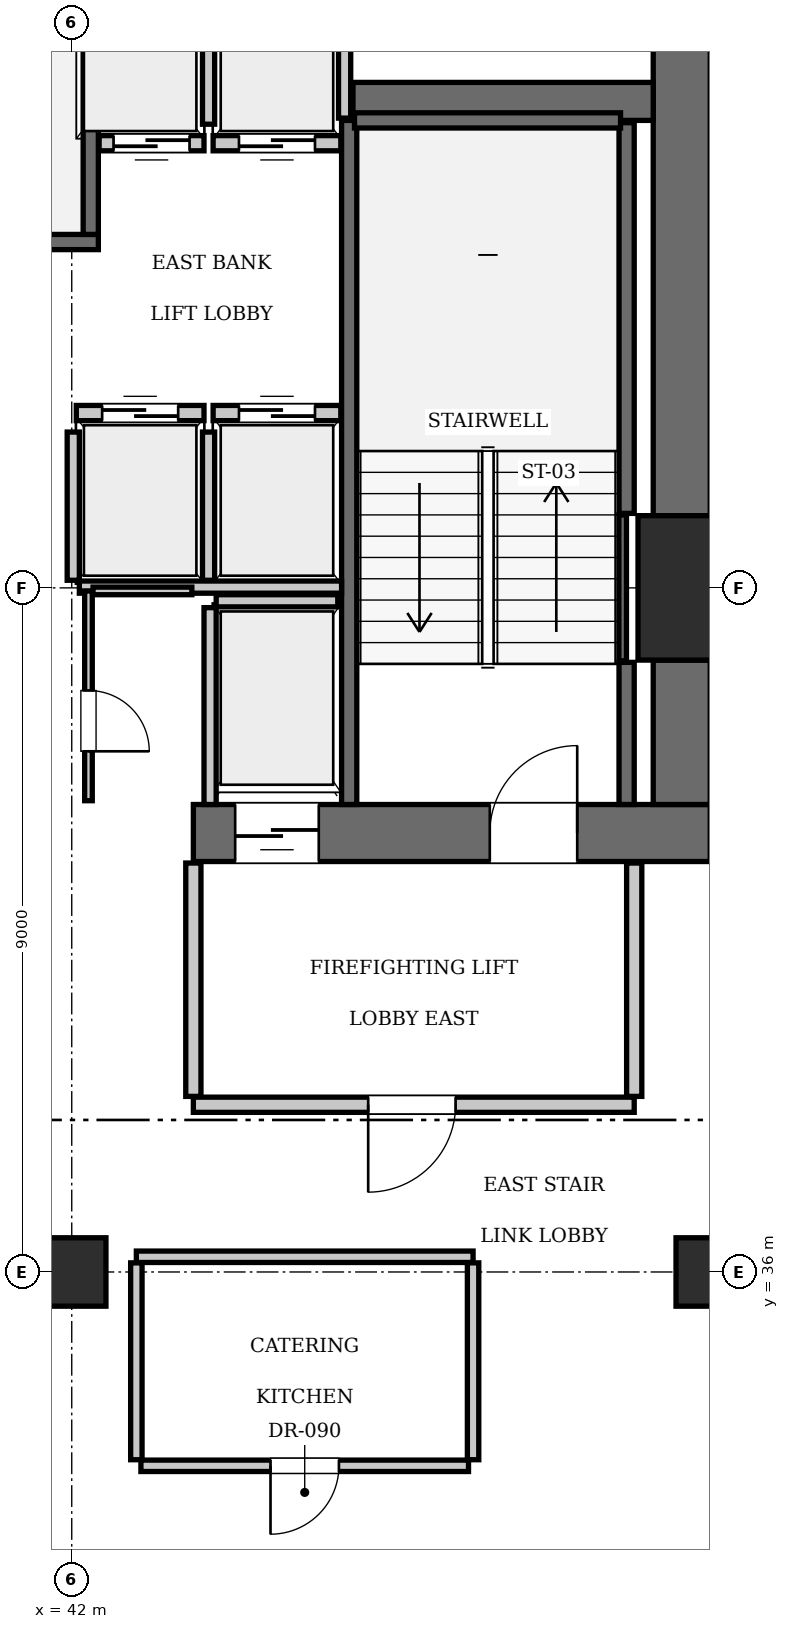
"""IFC4 building model, lengths in metres.
Left out: names, types, materials, properties, quantities, classifications, styles, units other than length and angle.
Written with IfcOpenShell. Run it as: python <this file> out.ifc"""

import sys

from ifc_helpers import new_model, si_unit, direction, frame, frame_2d, origin, origin_2d, place, context, subcontext, project, spatial, rectangle, extrude, element, fill, save


model = new_model("IFC4")
c1 = context("Model", 3, precision=1e-05, world=origin(), true_north=direction((0.0, 1.0)))
c2 = subcontext(c1, "Body", "Model", "MODEL_VIEW")
j1 = project(units=[si_unit("LENGTHUNIT", "METRE"), si_unit("PLANEANGLEUNIT", "RADIAN")], contexts=[c1])
p1 = place(None, origin())
s1 = spatial("IfcSite", under=j1, at=p1, CompositionType="ELEMENT")
p2 = place(p1, origin())
s2 = spatial("IfcBuilding", under=s1, at=p2, CompositionType="ELEMENT")
p3 = place(p2, frame((0.0, 0.0, 212.1)))
s3 = spatial("IfcBuildingStorey", under=s2, at=p3, CompositionType="ELEMENT", Elevation=212.1)
p4 = place(p3, frame((50.4, 45.0, 0.0), z_axis=(0.0, 0.0, 1.0), x_axis=(1.0, 0.0, 0.0)))
e1 = element("IfcColumn", 1, at=p4, inside=s3, PredefinedType="COLUMN", context=c2, shape_type="SweptSolid", body=[
    extrude(rectangle(XDim=1.9, YDim=1.9, at=origin_2d()), origin(), (0.0, 0.0, 1.0), 3.85),
])
p5 = place(p3, frame((43.6, 41.775, 0.0), z_axis=(0.0, 0.0, 1.0), x_axis=(1.0, 0.0, 0.0)))
e2 = element("IfcWall", 2, at=p5, inside=s3, PredefinedType="SHEAR", context=c2, shape_type="SweptSolid", body=[
    extrude(rectangle(XDim=6.8, YDim=0.75, at=frame_2d((3.4, 0.0))), origin(), (0.0, 0.0, 1.0), 3.85),
])
p6 = place(p5, frame((3.9, 0.0, 0.0)))
e3 = element("IfcOpeningElement", 3, at=p6, cuts=e2, PredefinedType="OPENING", context=c2, shape_type="SweptSolid", body=[
    extrude(rectangle(XDim=1.15, YDim=2.15, at=frame_2d((0.575, 1.075))), frame((0.0, 0.385, 0.0), z_axis=(0.0, -1.0, 0.0), x_axis=(1.0, 0.0, 0.0)), (0.0, 0.0, 1.0), 0.77),
])
p7 = place(p5, frame((0.55, 0.0, 0.0)))
e4 = element("IfcOpeningElement", 4, at=p7, cuts=e2, PredefinedType="OPENING", context=c2, shape_type="SweptSolid", body=[
    extrude(rectangle(XDim=1.1, YDim=2.2, at=frame_2d((0.55, 1.1))), frame((0.0, 0.385, 0.0), z_axis=(0.0, -1.0, 0.0), x_axis=(1.0, 0.0, 0.0)), (0.0, 0.0, 1.0), 0.77),
])
p8 = place(p3, frame((50.025, 42.15, 0.0), z_axis=(0.0, 0.0, 1.0), x_axis=(0.0, 1.0, 0.0)))
e5 = element("IfcWall", 5, at=p8, inside=s3, PredefinedType="SHEAR", context=c2, shape_type="SweptSolid", body=[
    extrude(rectangle(XDim=1.9, YDim=0.75, at=frame_2d((0.95, 0.0))), origin(), (0.0, 0.0, 1.0), 3.85),
])
p9 = place(p3, frame((50.025, 45.95, 0.0), z_axis=(0.0, 0.0, 1.0), x_axis=(0.0, 1.0, 0.0)))
e6 = element("IfcWall", 6, at=p9, inside=s3, PredefinedType="SHEAR", context=c2, shape_type="SweptSolid", body=[
    extrude(rectangle(XDim=7.3, YDim=0.75, at=frame_2d((3.65, 0.0))), origin(), (0.0, 0.0, 1.0), 3.85),
])
p10 = place(p3, frame((45.7, 51.4, 0.0), z_axis=(0.0, 0.0, 1.0), x_axis=(1.0, 0.0, 0.0)))
e7 = element("IfcWall", 7, at=p10, inside=s3, PredefinedType="SHEAR", context=c2, shape_type="SweptSolid", body=[
    extrude(rectangle(XDim=3.95, YDim=0.5, at=frame_2d((1.975, 0.0))), origin(), (0.0, 0.0, 1.0), 3.85),
])
for number, where, z_axis, x_axis in (
    (8, (42.0, 36.0, 0.0), (0.0, 0.0, 1.0), (1.0, 0.0, 0.0)),
    (9, (50.4, 36.0, 0.0), (0.0, 0.0, 1.0), (1.0, 0.0, 0.0)),
):
    element("IfcColumn", number, at=place(p3, frame(where, z_axis=z_axis, x_axis=x_axis)), inside=s3, PredefinedType="COLUMN", context=c2, shape_type="SweptSolid", body=[
        extrude(rectangle(XDim=0.9, YDim=0.9, at=origin_2d()), origin(), (0.0, 0.0, 1.0), 3.85),
    ])
p11 = place(p3, frame((33.25, 49.55, 0.0), z_axis=(0.0, 0.0, 1.0), x_axis=(1.0, 0.0, 0.0)))
e10 = element("IfcWall", 10, at=p11, inside=s3, PredefinedType="SOLIDWALL", context=c2, shape_type="SweptSolid", body=[
    extrude(rectangle(XDim=9.1, YDim=0.2, at=frame_2d((4.55, 0.0))), origin(), (0.0, 0.0, 1.0), 3.61),
])
p12 = place(p3, frame((42.25, 49.65, 0.0), z_axis=(0.0, 0.0, 1.0), x_axis=(0.0, 1.0, 0.0)))
e11 = element("IfcWall", 11, at=p12, inside=s3, PredefinedType="SOLIDWALL", context=c2, shape_type="SweptSolid", body=[
    extrude(rectangle(XDim=3.6, YDim=0.2, at=frame_2d((1.8, 0.0))), origin(), (0.0, 0.0, 1.0), 3.61),
])
p13 = place(p3, frame((45.65, 42.15, 0.0), z_axis=(0.0, 0.0, 1.0), x_axis=(0.0, 1.0, 0.0)))
e12 = element("IfcWall", 12, at=p13, inside=s3, PredefinedType="SOLIDWALL", context=c2, shape_type="SweptSolid", body=[
    extrude(rectangle(XDim=9.0, YDim=0.2, at=frame_2d((4.5, 0.0))), origin(), (0.0, 0.0, 1.0), 3.61),
])
p14 = place(p3, frame((49.3, 42.15, 0.0), z_axis=(0.0, 0.0, 1.0), x_axis=(0.0, 1.0, 0.0)))
e13 = element("IfcWall", 13, at=p14, inside=s3, PredefinedType="SOLIDWALL", context=c2, shape_type="SweptSolid", body=[
    extrude(rectangle(XDim=1.87, YDim=0.2, at=frame_2d((0.935, 0.0))), origin(), (0.0, 0.0, 1.0), 3.61),
])
p15 = place(p3, frame((49.3, 45.98, 0.0), z_axis=(0.0, 0.0, 1.0), x_axis=(0.0, 1.0, 0.0)))
e14 = element("IfcWall", 14, at=p15, inside=s3, PredefinedType="SOLIDWALL", context=c2, shape_type="SweptSolid", body=[
    extrude(rectangle(XDim=5.14, YDim=0.2, at=frame_2d((2.57, 0.0))), origin(), (0.0, 0.0, 1.0), 3.61),
])
p16 = place(p3, frame((45.72, 51.15, 0.0), z_axis=(0.0, 0.0, 1.0), x_axis=(1.0, 0.0, 0.0)))
e15 = element("IfcWall", 15, at=p16, inside=s3, PredefinedType="SOLIDWALL", context=c2, shape_type="SweptSolid", body=[
    extrude(rectangle(XDim=3.5, YDim=0.2, at=frame_2d((1.75, 0.0))), origin(), (0.0, 0.0, 1.0), 3.61),
])
p17 = place(p3, frame((49.248, 44.04, 0.0), z_axis=(0.0, 0.0, 1.0), x_axis=(0.0, 1.0, 0.0)))
e16 = element("IfcWall", 16, at=p17, inside=s3, PredefinedType="SOLIDWALL", context=c2, shape_type="SweptSolid", body=[
    extrude(rectangle(XDim=1.92, YDim=0.1, at=frame_2d((0.96, 0.0))), origin(), (0.0, 0.0, 1.0), 3.61),
])
p18 = place(p3, frame((42.06, 47.3, 0.0), z_axis=(0.0, 0.0, 1.0), x_axis=(1.0, 0.0, 0.0)))
e17 = element("IfcWall", 17, at=p18, inside=s3, PredefinedType="SOLIDWALL", context=c2, shape_type="SweptSolid", body=[
    extrude(rectangle(XDim=1.68, YDim=0.2, at=frame_2d((0.84, 0.0))), origin(), (0.0, 0.0, 1.0), 3.61),
])
p19 = place(p18, frame((0.34, 0.0, 0.0)))
e18 = element("IfcOpeningElement", 18, at=p19, cuts=e17, PredefinedType="OPENING", context=c2, shape_type="SweptSolid", body=[
    extrude(rectangle(XDim=1.0, YDim=2.15, at=frame_2d((0.5, 1.075))), frame((0.0, 0.11, 0.0), z_axis=(0.0, -1.0, 0.0), x_axis=(1.0, 0.0, 0.0)), (0.0, 0.0, 1.0), 0.22),
])
p20 = place(p3, frame((43.86, 47.3, 0.0), z_axis=(0.0, 0.0, 1.0), x_axis=(1.0, 0.0, 0.0)))
e19 = element("IfcWall", 19, at=p20, inside=s3, PredefinedType="SOLIDWALL", context=c2, shape_type="SweptSolid", body=[
    extrude(rectangle(XDim=1.68, YDim=0.2, at=frame_2d((0.84, 0.0))), origin(), (0.0, 0.0, 1.0), 3.61),
])
p21 = place(p20, frame((0.34, 0.0, 0.0)))
e20 = element("IfcOpeningElement", 20, at=p21, cuts=e19, PredefinedType="OPENING", context=c2, shape_type="SweptSolid", body=[
    extrude(rectangle(XDim=1.0, YDim=2.15, at=frame_2d((0.5, 1.075))), frame((0.0, 0.11, 0.0), z_axis=(0.0, -1.0, 0.0), x_axis=(1.0, 0.0, 0.0)), (0.0, 0.0, 1.0), 0.22),
])
p22 = place(p3, frame((42.36, 50.85, 0.0), z_axis=(0.0, 0.0, 1.0), x_axis=(1.0, 0.0, 0.0)))
e21 = element("IfcWall", 21, at=p22, inside=s3, PredefinedType="SOLIDWALL", context=c2, shape_type="SweptSolid", body=[
    extrude(rectangle(XDim=1.38, YDim=0.2, at=frame_2d((0.69, 0.0))), origin(), (0.0, 0.0, 1.0), 3.61),
])
p23 = place(p22, frame((0.19, 0.0, 0.0)))
e22 = element("IfcOpeningElement", 22, at=p23, cuts=e21, PredefinedType="OPENING", context=c2, shape_type="SweptSolid", body=[
    extrude(rectangle(XDim=1.0, YDim=2.15, at=frame_2d((0.5, 1.075))), frame((0.0, 0.11, 0.0), z_axis=(0.0, -1.0, 0.0), x_axis=(1.0, 0.0, 0.0)), (0.0, 0.0, 1.0), 0.22),
])
p24 = place(p3, frame((43.86, 50.85, 0.0), z_axis=(0.0, 0.0, 1.0), x_axis=(1.0, 0.0, 0.0)))
e23 = element("IfcWall", 23, at=p24, inside=s3, PredefinedType="SOLIDWALL", context=c2, shape_type="SweptSolid", body=[
    extrude(rectangle(XDim=1.68, YDim=0.2, at=frame_2d((0.84, 0.0))), origin(), (0.0, 0.0, 1.0), 3.61),
])
p25 = place(p24, frame((0.34, 0.0, 0.0)))
e24 = element("IfcOpeningElement", 24, at=p25, cuts=e23, PredefinedType="OPENING", context=c2, shape_type="SweptSolid", body=[
    extrude(rectangle(XDim=1.0, YDim=2.15, at=frame_2d((0.5, 1.075))), frame((0.0, 0.11, 0.0), z_axis=(0.0, -1.0, 0.0), x_axis=(1.0, 0.0, 0.0)), (0.0, 0.0, 1.0), 0.22),
])
p26 = place(p3, frame((43.9, 44.83, 0.0), z_axis=(0.0, 0.0, 1.0), x_axis=(1.0, 0.0, 0.0)))
e25 = element("IfcWall", 25, at=p26, inside=s3, PredefinedType="SOLIDWALL", context=c2, shape_type="SweptSolid", body=[
    extrude(rectangle(XDim=1.6, YDim=0.16, at=frame_2d((0.8, 0.0))), origin(), (0.0, 0.0, 1.0), 3.61),
])
p27 = place(p3, frame((43.82, 42.15, 0.0), z_axis=(0.0, 0.0, 1.0), x_axis=(0.0, 1.0, 0.0)))
e26 = element("IfcWall", 26, at=p27, inside=s3, PredefinedType="SOLIDWALL", context=c2, shape_type="SweptSolid", body=[
    extrude(rectangle(XDim=2.59, YDim=0.16, at=frame_2d((1.295, 0.0))), origin(), (0.0, 0.0, 1.0), 3.61),
])
for number, where, z_axis, x_axis in (
    (27, (42.02, 45.1, 0.0), (0.0, 0.0, 1.0), (0.0, 1.0, 0.0)),
    (28, (43.8, 45.1, 0.0), (0.0, 0.0, 1.0), (0.0, 1.0, 0.0)),
):
    element("IfcWall", number, at=place(p3, frame(where, z_axis=z_axis, x_axis=x_axis)), inside=s3, PredefinedType="SOLIDWALL", context=c2, shape_type="SweptSolid", body=[
        extrude(rectangle(XDim=1.95, YDim=0.16, at=frame_2d((0.975, 0.0))), origin(), (0.0, 0.0, 1.0), 3.61),
    ])
p28 = place(p3, frame((42.1, 45.01, 0.0), z_axis=(0.0, 0.0, 1.0), x_axis=(1.0, 0.0, 0.0)))
e29 = element("IfcWall", 29, at=p28, inside=s3, PredefinedType="SOLIDWALL", context=c2, shape_type="SweptSolid", body=[
    extrude(rectangle(XDim=3.45, YDim=0.16, at=frame_2d((1.725, 0.0))), origin(), (0.0, 0.0, 1.0), 3.61),
])
p29 = place(p3, frame((45.59, 51.18, 0.0), z_axis=(0.0, 0.0, 1.0), x_axis=(0.0, 1.0, 0.0)))
e30 = element("IfcWall", 30, at=p29, inside=s3, PredefinedType="SOLIDWALL", context=c2, shape_type="SweptSolid", body=[
    extrude(rectangle(XDim=2.07, YDim=0.16, at=frame_2d((1.035, 0.0))), origin(), (0.0, 0.0, 1.0), 3.61),
])
p30 = place(p3, frame((43.8, 51.1, 0.0), z_axis=(0.0, 0.0, 1.0), x_axis=(0.0, 1.0, 0.0)))
e31 = element("IfcWall", 31, at=p30, inside=s3, PredefinedType="SOLIDWALL", context=c2, shape_type="SweptSolid", body=[
    extrude(rectangle(XDim=2.15, YDim=0.16, at=frame_2d((1.075, 0.0))), origin(), (0.0, 0.0, 1.0), 3.61),
])
p31 = place(p3, frame((43.6, 38.2, 0.0), z_axis=(0.0, 0.0, 1.0), x_axis=(1.0, 0.0, 0.0)))
e32 = element("IfcWall", 32, at=p31, inside=s3, PredefinedType="PARTITIONING", context=c2, shape_type="SweptSolid", body=[
    extrude(rectangle(XDim=5.8, YDim=0.2, at=frame_2d((2.9, 0.0))), origin(), (0.0, 0.0, 1.0), 3.61),
])
p32 = place(p31, frame((2.3, 0.0, 0.0)))
e33 = element("IfcOpeningElement", 33, at=p32, cuts=e32, PredefinedType="OPENING", context=c2, shape_type="SweptSolid", body=[
    extrude(rectangle(XDim=1.15, YDim=2.15, at=frame_2d((0.575, 1.075))), frame((0.0, 0.11, 0.0), z_axis=(0.0, -1.0, 0.0), x_axis=(1.0, 0.0, 0.0)), (0.0, 0.0, 1.0), 0.22),
])
for number, where, z_axis, x_axis in (
    (34, (43.6, 38.31, 0.0), (0.0, 0.0, 1.0), (0.0, 1.0, 0.0)),
    (35, (49.4, 38.31, 0.0), (0.0, 0.0, 1.0), (0.0, 1.0, 0.0)),
):
    element("IfcWall", number, at=place(p3, frame(where, z_axis=z_axis, x_axis=x_axis)), inside=s3, PredefinedType="PARTITIONING", context=c2, shape_type="SweptSolid", body=[
        extrude(rectangle(XDim=3.07, YDim=0.2, at=frame_2d((1.535, 0.0))), origin(), (0.0, 0.0, 1.0), 3.61),
    ])
p33 = place(p3, frame((42.22, 42.2, 0.0), z_axis=(0.0, 0.0, 1.0), x_axis=(0.0, 1.0, 0.0)))
e36 = element("IfcWall", 36, at=p33, inside=s3, PredefinedType="PARTITIONING", context=c2, shape_type="SweptSolid", body=[
    extrude(rectangle(XDim=2.76, YDim=0.1, at=frame_2d((1.38, 0.0))), origin(), (0.0, 0.0, 1.0), 3.61),
])
p34 = place(p33, frame((0.65, 0.0, 0.0)))
e37 = element("IfcOpeningElement", 37, at=p34, cuts=e36, PredefinedType="OPENING", context=c2, shape_type="SweptSolid", body=[
    extrude(rectangle(XDim=0.8, YDim=2.05, at=frame_2d((0.4, 1.025))), frame((0.0, 0.06, 0.0), z_axis=(0.0, -1.0, 0.0), x_axis=(1.0, 0.0, 0.0)), (0.0, 0.0, 1.0), 0.12),
])
p35 = place(p3, frame((42.28, 44.96, 0.0), z_axis=(0.0, 0.0, 1.0), x_axis=(1.0, 0.0, 0.0)))
e38 = element("IfcWall", 38, at=p35, inside=s3, PredefinedType="PARTITIONING", context=c2, shape_type="SweptSolid", body=[
    extrude(rectangle(XDim=1.3, YDim=0.1, at=frame_2d((0.65, 0.0))), origin(), (0.0, 0.0, 1.0), 3.61),
])
p36 = place(p3, frame((42.85, 36.2, 0.0), z_axis=(0.0, 0.0, 1.0), x_axis=(1.0, 0.0, 0.0)))
e39 = element("IfcWall", 39, at=p36, inside=s3, PredefinedType="PARTITIONING", context=c2, shape_type="SweptSolid", body=[
    extrude(rectangle(XDim=4.43, YDim=0.15, at=frame_2d((2.215, 0.0))), origin(), (0.0, 0.0, 1.0), 3.61),
])
for number, where, z_axis, x_axis in (
    (40, (42.85, 33.53, 0.0), (0.0, 0.0, 1.0), (0.0, 1.0, 0.0)),
    (41, (47.28, 33.53, 0.0), (0.0, 0.0, 1.0), (0.0, 1.0, 0.0)),
):
    element("IfcWall", number, at=place(p3, frame(where, z_axis=z_axis, x_axis=x_axis)), inside=s3, PredefinedType="PARTITIONING", context=c2, shape_type="SweptSolid", body=[
        extrude(rectangle(XDim=2.59, YDim=0.15, at=frame_2d((1.295, 0.0))), origin(), (0.0, 0.0, 1.0), 3.61),
    ])
p37 = place(p3, frame((42.91, 33.45, 0.0), z_axis=(0.0, 0.0, 1.0), x_axis=(1.0, 0.0, 0.0)))
e42 = element("IfcWall", 42, at=p37, inside=s3, PredefinedType="PARTITIONING", context=c2, shape_type="SweptSolid", body=[
    extrude(rectangle(XDim=4.31, YDim=0.15, at=frame_2d((2.155, 0.0))), origin(), (0.0, 0.0, 1.0), 3.61),
])
p38 = place(p37, frame((1.705, 0.0, 0.0)))
e43 = element("IfcOpeningElement", 43, at=p38, cuts=e42, PredefinedType="OPENING", context=c2, shape_type="SweptSolid", body=[
    extrude(rectangle(XDim=0.9, YDim=2.1, at=frame_2d((0.45, 1.05))), frame((0.0, 0.085, 0.0), z_axis=(0.0, -1.0, 0.0), x_axis=(1.0, 0.0, 0.0)), (0.0, 0.0, 1.0), 0.17),
])
p39 = place(p6, origin())
e44 = element("IfcDoor", 44, at=p39, inside=s3, OperationType="SINGLE_SWING_RIGHT", PredefinedType="DOOR", context=c2, shape_type="SweptSolid", body=[
    extrude(rectangle(XDim=1.15, YDim=2.15, at=frame_2d((0.575, 1.075))), frame((0.0, 0.025, 0.0), z_axis=(0.0, -1.0, 0.0), x_axis=(1.0, 0.0, 0.0)), (0.0, 0.0, 1.0), 0.05),
])
fill(e3, e44)
p40 = place(p19, origin())
e45 = element("IfcDoor", 45, at=p40, inside=s3, OperationType="SLIDING_TO_LEFT", PredefinedType="DOOR", context=c2, shape_type="SweptSolid", body=[
    extrude(rectangle(XDim=1.0, YDim=2.15, at=frame_2d((0.5, 1.075))), frame((0.0, 0.025, 0.0), z_axis=(0.0, -1.0, 0.0), x_axis=(1.0, 0.0, 0.0)), (0.0, 0.0, 1.0), 0.05),
])
fill(e18, e45)
p41 = place(p21, origin())
e46 = element("IfcDoor", 46, at=p41, inside=s3, OperationType="SLIDING_TO_LEFT", PredefinedType="DOOR", context=c2, shape_type="SweptSolid", body=[
    extrude(rectangle(XDim=1.0, YDim=2.15, at=frame_2d((0.5, 1.075))), frame((0.0, 0.025, 0.0), z_axis=(0.0, -1.0, 0.0), x_axis=(1.0, 0.0, 0.0)), (0.0, 0.0, 1.0), 0.05),
])
fill(e20, e46)
p42 = place(p23, frame((1.0, 0.0, 0.0), z_axis=(0.0, 0.0, 1.0), x_axis=(-1.0, 0.0, 0.0)))
e47 = element("IfcDoor", 47, at=p42, inside=s3, OperationType="SLIDING_TO_LEFT", PredefinedType="DOOR", context=c2, shape_type="SweptSolid", body=[
    extrude(rectangle(XDim=1.0, YDim=2.15, at=frame_2d((0.5, 1.075))), frame((0.0, 0.025, 0.0), z_axis=(0.0, -1.0, 0.0), x_axis=(1.0, 0.0, 0.0)), (0.0, 0.0, 1.0), 0.05),
])
fill(e22, e47)
p43 = place(p25, frame((1.0, 0.0, 0.0), z_axis=(0.0, 0.0, 1.0), x_axis=(-1.0, 0.0, 0.0)))
e48 = element("IfcDoor", 48, at=p43, inside=s3, OperationType="SLIDING_TO_LEFT", PredefinedType="DOOR", context=c2, shape_type="SweptSolid", body=[
    extrude(rectangle(XDim=1.0, YDim=2.15, at=frame_2d((0.5, 1.075))), frame((0.0, 0.025, 0.0), z_axis=(0.0, -1.0, 0.0), x_axis=(1.0, 0.0, 0.0)), (0.0, 0.0, 1.0), 0.05),
])
fill(e24, e48)
p44 = place(p7, frame((1.1, 0.0, 0.0), z_axis=(0.0, 0.0, 1.0), x_axis=(-1.0, 0.0, 0.0)))
e49 = element("IfcDoor", 49, at=p44, inside=s3, OperationType="SLIDING_TO_LEFT", PredefinedType="DOOR", context=c2, shape_type="SweptSolid", body=[
    extrude(rectangle(XDim=1.1, YDim=2.2, at=frame_2d((0.55, 1.1))), frame((0.0, 0.025, 0.0), z_axis=(0.0, -1.0, 0.0), x_axis=(1.0, 0.0, 0.0)), (0.0, 0.0, 1.0), 0.05),
])
fill(e4, e49)
p45 = place(p32, frame((1.15, 0.0, 0.0), z_axis=(0.0, 0.0, 1.0), x_axis=(-1.0, 0.0, 0.0)))
e50 = element("IfcDoor", 50, at=p45, inside=s3, OperationType="SINGLE_SWING_RIGHT", PredefinedType="DOOR", context=c2, shape_type="SweptSolid", body=[
    extrude(rectangle(XDim=1.15, YDim=2.15, at=frame_2d((0.575, 1.075))), frame((0.0, 0.025, 0.0), z_axis=(0.0, -1.0, 0.0), x_axis=(1.0, 0.0, 0.0)), (0.0, 0.0, 1.0), 0.05),
])
fill(e33, e50)
p46 = place(p34, frame((0.8, 0.0, 0.0), z_axis=(0.0, 0.0, 1.0), x_axis=(-1.0, 0.0, 0.0)))
e51 = element("IfcDoor", 51, at=p46, inside=s3, OperationType="SINGLE_SWING_RIGHT", PredefinedType="DOOR", context=c2, shape_type="SweptSolid", body=[
    extrude(rectangle(XDim=0.8, YDim=2.05, at=frame_2d((0.4, 1.025))), frame((0.0, 0.025, 0.0), z_axis=(0.0, -1.0, 0.0), x_axis=(1.0, 0.0, 0.0)), (0.0, 0.0, 1.0), 0.05),
])
fill(e37, e51)
p47 = place(p38, frame((0.9, 0.0, 0.0), z_axis=(0.0, 0.0, 1.0), x_axis=(-1.0, 0.0, 0.0)))
e52 = element("IfcDoor", 52, at=p47, inside=s3, OperationType="SINGLE_SWING_RIGHT", PredefinedType="DOOR", context=c2, shape_type="SweptSolid", body=[
    extrude(rectangle(XDim=0.9, YDim=2.1, at=frame_2d((0.45, 1.05))), frame((0.0, 0.025, 0.0), z_axis=(0.0, -1.0, 0.0), x_axis=(1.0, 0.0, 0.0)), (0.0, 0.0, 1.0), 0.05),
])
fill(e43, e52)
save(model, sys.argv[1])
